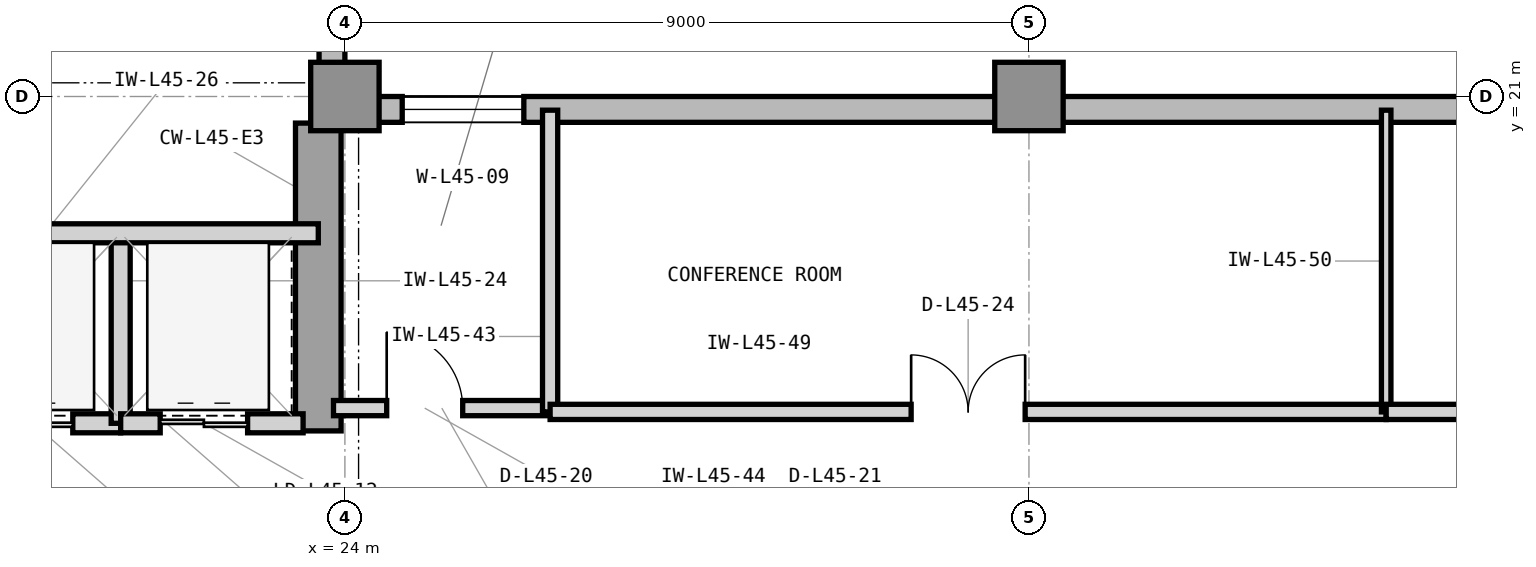
"""IFC4 building model, lengths in metres.
Left out: names, types, materials, properties, quantities, classifications, styles, units other than length and angle.
Written with IfcOpenShell. Run it as: python <this file> out.ifc"""

import sys

from ifc_helpers import new_model, si_unit, direction, frame, frame_2d, origin, origin_2d, place, context, subcontext, project, spatial, rectangle, extrude, element, fill, save


model = new_model("IFC4")
c1 = context("Model", 3, precision=1e-05, world=origin(), true_north=direction((0.0, 1.0)))
c2 = subcontext(c1, "Body", "Model", "MODEL_VIEW")
j1 = project(units=[si_unit("LENGTHUNIT", "METRE"), si_unit("PLANEANGLEUNIT", "RADIAN")], contexts=[c1])
p1 = place(None, origin())
s1 = spatial("IfcSite", under=j1, at=p1, CompositionType="ELEMENT")
p2 = place(p1, origin())
s2 = spatial("IfcBuilding", under=s1, at=p2, CompositionType="ELEMENT")
p3 = place(p2, frame((0.0, 0.0, 187.8)))
s3 = spatial("IfcBuildingStorey", under=s2, at=p3, CompositionType="ELEMENT", Elevation=187.8)
p4 = place(p3, frame((23.65, 16.6, 0.0), z_axis=(0.0, 0.0, 1.0), x_axis=(0.0, 1.0, 0.0)))
e1 = element("IfcWall", 1, at=p4, inside=s3, PredefinedType="SHEAR", context=c2, shape_type="SweptSolid", body=[
    extrude(rectangle(XDim=4.05, YDim=0.6, at=frame_2d((2.025, 0.0))), origin(), (0.0, 0.0, 1.0), 3.9),
])
for number, where, z_axis, x_axis in (
    (2, (24.0, 21.0, 0.0), (0.0, 0.0, 1.0), (1.0, 0.0, 0.0)),
    (3, (33.0, 21.0, 0.0), (0.0, 0.0, 1.0), (1.0, 0.0, 0.0)),
):
    element("IfcColumn", number, at=place(p3, frame(where, z_axis=z_axis, x_axis=x_axis)), inside=s3, PredefinedType="COLUMN", context=c2, shape_type="SweptSolid", body=[
        extrude(rectangle(XDim=0.9, YDim=0.9, at=origin_2d()), origin(), (0.0, 0.0, 1.0), 3.9),
    ])
p5 = place(p3, frame((55.4, 20.83, 0.0), z_axis=(0.0, 0.0, 1.0), x_axis=(-1.0, 0.0, 0.0)))
e4 = element("IfcWall", 4, at=p5, inside=s3, PredefinedType="STANDARD", context=c2, shape_type="SweptSolid", body=[
    extrude(rectangle(XDim=31.4, YDim=0.34, at=frame_2d((15.7, 0.0))), origin(), (0.0, 0.0, 1.0), 3.7),
])
p6 = place(p5, frame((29.046, 0.0, 0.9)))
e5 = element("IfcOpeningElement", 5, at=p6, cuts=e4, PredefinedType="OPENING", context=c2, shape_type="SweptSolid", body=[
    extrude(rectangle(XDim=1.6, YDim=2.2, at=frame_2d((0.8, 1.1))), frame((0.0, 0.18, 0.0), z_axis=(0.0, -1.0, 0.0), x_axis=(1.0, 0.0, 0.0)), (0.0, 0.0, 1.0), 0.36),
])
p7 = place(p5, frame((10.125, 0.0, 0.9)))
e6 = element("IfcOpeningElement", 6, at=p7, cuts=e4, PredefinedType="OPENING", context=c2, shape_type="SweptSolid", body=[
    extrude(rectangle(XDim=2.3, YDim=2.2, at=frame_2d((1.15, 1.1))), frame((0.0, 0.18, 0.0), z_axis=(0.0, -1.0, 0.0), x_axis=(1.0, 0.0, 0.0)), (0.0, 0.0, 1.0), 0.36),
])
p8 = place(p3, frame((23.83, 21.0, 0.0), z_axis=(0.0, 0.0, 1.0), x_axis=(0.0, 1.0, 0.0)))
e7 = element("IfcWall", 7, at=p8, inside=s3, PredefinedType="STANDARD", context=c2, shape_type="SweptSolid", body=[
    extrude(rectangle(XDim=22.4, YDim=0.34, at=frame_2d((11.2, 0.0))), origin(), (0.0, 0.0, 1.0), 3.7),
])
p9 = place(p8, frame((10.955, 0.0, 0.9)))
e8 = element("IfcOpeningElement", 8, at=p9, cuts=e7, PredefinedType="OPENING", context=c2, shape_type="SweptSolid", body=[
    extrude(rectangle(XDim=2.3, YDim=2.2, at=frame_2d((1.15, 1.1))), frame((0.0, 0.18, 0.0), z_axis=(0.0, -1.0, 0.0), x_axis=(1.0, 0.0, 0.0)), (0.0, 0.0, 1.0), 0.36),
])
p10 = place(p3, frame((18.75, 16.7, 0.0), z_axis=(0.0, 0.0, 1.0), x_axis=(1.0, 0.0, 0.0)))
e9 = element("IfcWall", 9, at=p10, inside=s3, PredefinedType="PARTITIONING", context=c2, shape_type="SweptSolid", body=[
    extrude(rectangle(XDim=2.3, YDim=0.25, at=frame_2d((1.15, 0.0))), origin(), (0.0, 0.0, 1.0), 3.283),
])
p11 = place(p10, frame((0.52, 0.0, 0.0)))
e10 = element("IfcOpeningElement", 10, at=p11, cuts=e9, PredefinedType="OPENING", context=c2, shape_type="SweptSolid", body=[
    extrude(rectangle(XDim=1.15, YDim=2.25, at=frame_2d((0.575, 1.125))), frame((0.0, 0.135, 0.0), z_axis=(0.0, -1.0, 0.0), x_axis=(1.0, 0.0, 0.0)), (0.0, 0.0, 1.0), 0.27),
])
p12 = place(p3, frame((21.05, 16.7, 0.0), z_axis=(0.0, 0.0, 1.0), x_axis=(0.0, 1.0, 0.0)))
e11 = element("IfcWall", 11, at=p12, inside=s3, PredefinedType="PARTITIONING", context=c2, shape_type="SweptSolid", body=[
    extrude(rectangle(XDim=2.5, YDim=0.25, at=frame_2d((1.25, 0.0))), origin(), (0.0, 0.0, 1.0), 3.69),
])
p13 = place(p3, frame((21.05, 16.7, 0.0), z_axis=(0.0, 0.0, 1.0), x_axis=(1.0, 0.0, 0.0)))
e12 = element("IfcWall", 12, at=p13, inside=s3, PredefinedType="PARTITIONING", context=c2, shape_type="SweptSolid", body=[
    extrude(rectangle(XDim=2.4, YDim=0.25, at=frame_2d((1.2, 0.0))), origin(), (0.0, 0.0, 1.0), 3.283),
])
p14 = place(p13, frame((0.52, 0.0, 0.0)))
e13 = element("IfcOpeningElement", 13, at=p14, cuts=e12, PredefinedType="OPENING", context=c2, shape_type="SweptSolid", body=[
    extrude(rectangle(XDim=1.15, YDim=2.25, at=frame_2d((0.575, 1.125))), frame((0.0, 0.135, 0.0), z_axis=(0.0, -1.0, 0.0), x_axis=(1.0, 0.0, 0.0)), (0.0, 0.0, 1.0), 0.27),
])
p15 = place(p3, frame((16.45, 19.2, 0.0), z_axis=(0.0, 0.0, 1.0), x_axis=(1.0, 0.0, 0.0)))
e14 = element("IfcWall", 14, at=p15, inside=s3, PredefinedType="PARTITIONING", context=c2, shape_type="SweptSolid", body=[
    extrude(rectangle(XDim=7.2, YDim=0.25, at=frame_2d((3.6, 0.0))), origin(), (0.0, 0.0, 1.0), 3.69),
])
p16 = place(p3, frame((23.85, 16.9, 0.0), z_axis=(0.0, 0.0, 1.0), x_axis=(1.0, 0.0, 0.0)))
e15 = element("IfcWall", 15, at=p16, inside=s3, PredefinedType="PARTITIONING", context=c2, shape_type="SweptSolid", body=[
    extrude(rectangle(XDim=2.85, YDim=0.2, at=frame_2d((1.425, 0.0))), origin(), (0.0, 0.0, 1.0), 3.69),
])
p17 = place(p16, frame((0.7, 0.0, 0.0)))
e16 = element("IfcOpeningElement", 16, at=p17, cuts=e15, PredefinedType="OPENING", context=c2, shape_type="SweptSolid", body=[
    extrude(rectangle(XDim=1.0, YDim=2.15, at=frame_2d((0.5, 1.075))), frame((0.0, 0.11, 0.0), z_axis=(0.0, -1.0, 0.0), x_axis=(1.0, 0.0, 0.0)), (0.0, 0.0, 1.0), 0.22),
])
p18 = place(p3, frame((26.7, 16.85, 0.0), z_axis=(0.0, 0.0, 1.0), x_axis=(0.0, 1.0, 0.0)))
e17 = element("IfcWall", 17, at=p18, inside=s3, PredefinedType="PARTITIONING", context=c2, shape_type="SweptSolid", body=[
    extrude(rectangle(XDim=3.97, YDim=0.2, at=frame_2d((1.985, 0.0))), origin(), (0.0, 0.0, 1.0), 3.69),
])
p19 = place(p3, frame((26.7, 16.85, 0.0), z_axis=(0.0, 0.0, 1.0), x_axis=(1.0, 0.0, 0.0)))
e18 = element("IfcWall", 18, at=p19, inside=s3, PredefinedType="PARTITIONING", context=c2, shape_type="SweptSolid", body=[
    extrude(rectangle(XDim=11.0, YDim=0.2, at=frame_2d((5.5, 0.0))), origin(), (0.0, 0.0, 1.0), 3.69),
])
p20 = place(p19, frame((4.75, 0.0, 0.0)))
e19 = element("IfcOpeningElement", 19, at=p20, cuts=e18, PredefinedType="OPENING", context=c2, shape_type="SweptSolid", body=[
    extrude(rectangle(XDim=1.5, YDim=2.3, at=frame_2d((0.75, 1.15))), frame((0.0, 0.11, 0.0), z_axis=(0.0, -1.0, 0.0), x_axis=(1.0, 0.0, 0.0)), (0.0, 0.0, 1.0), 0.22),
])
p21 = place(p3, frame((37.7, 16.85, 0.0), z_axis=(0.0, 0.0, 1.0), x_axis=(0.0, 1.0, 0.0)))
e20 = element("IfcWall", 20, at=p21, inside=s3, PredefinedType="PARTITIONING", context=c2, shape_type="SweptSolid", body=[
    extrude(rectangle(XDim=3.97, YDim=0.125, at=frame_2d((1.985, 0.0))), origin(), (0.0, 0.0, 1.0), 3.69),
])
p22 = place(p3, frame((37.7, 16.85, 0.0), z_axis=(0.0, 0.0, 1.0), x_axis=(1.0, 0.0, 0.0)))
e21 = element("IfcWall", 21, at=p22, inside=s3, PredefinedType="PARTITIONING", context=c2, shape_type="SweptSolid", body=[
    extrude(rectangle(XDim=10.3, YDim=0.2, at=frame_2d((5.15, 0.0))), origin(), (0.0, 0.0, 1.0), 3.69),
])
p23 = place(p22, frame((4.65, 0.0, 0.0)))
e22 = element("IfcOpeningElement", 22, at=p23, cuts=e21, PredefinedType="OPENING", context=c2, shape_type="SweptSolid", body=[
    extrude(rectangle(XDim=1.0, YDim=2.15, at=frame_2d((0.5, 1.075))), frame((0.0, 0.11, 0.0), z_axis=(0.0, -1.0, 0.0), x_axis=(1.0, 0.0, 0.0)), (0.0, 0.0, 1.0), 0.22),
])
p24 = place(p11, origin())
e23 = element("IfcDoor", 23, at=p24, inside=s3, OperationType="DOUBLE_DOOR_SLIDING", PredefinedType="DOOR", context=c2, shape_type="SweptSolid", body=[
    extrude(rectangle(XDim=1.15, YDim=2.25, at=frame_2d((0.575, 1.125))), frame((0.0, 0.025, 0.0), z_axis=(0.0, -1.0, 0.0), x_axis=(1.0, 0.0, 0.0)), (0.0, 0.0, 1.0), 0.05),
])
fill(e10, e23)
p25 = place(p14, origin())
e24 = element("IfcDoor", 24, at=p25, inside=s3, OperationType="DOUBLE_DOOR_SLIDING", PredefinedType="DOOR", context=c2, shape_type="SweptSolid", body=[
    extrude(rectangle(XDim=1.15, YDim=2.25, at=frame_2d((0.575, 1.125))), frame((0.0, 0.025, 0.0), z_axis=(0.0, -1.0, 0.0), x_axis=(1.0, 0.0, 0.0)), (0.0, 0.0, 1.0), 0.05),
])
fill(e13, e24)
p26 = place(p17, origin())
e25 = element("IfcDoor", 25, at=p26, inside=s3, OperationType="SINGLE_SWING_LEFT", PredefinedType="DOOR", context=c2, shape_type="SweptSolid", body=[
    extrude(rectangle(XDim=1.0, YDim=2.15, at=frame_2d((0.5, 1.075))), frame((0.0, 0.025, 0.0), z_axis=(0.0, -1.0, 0.0), x_axis=(1.0, 0.0, 0.0)), (0.0, 0.0, 1.0), 0.05),
])
fill(e16, e25)
p27 = place(p20, origin())
e26 = element("IfcDoor", 26, at=p27, inside=s3, OperationType="DOUBLE_DOOR_SINGLE_SWING", PredefinedType="DOOR", context=c2, shape_type="SweptSolid", body=[
    extrude(rectangle(XDim=1.5, YDim=2.3, at=frame_2d((0.75, 1.15))), frame((0.0, 0.025, 0.0), z_axis=(0.0, -1.0, 0.0), x_axis=(1.0, 0.0, 0.0)), (0.0, 0.0, 1.0), 0.05),
])
fill(e19, e26)
p28 = place(p6, origin())
e27 = element("IfcWindow", 27, at=p28, inside=s3, PartitioningType="SINGLE_PANEL", PredefinedType="WINDOW", context=c2, shape_type="SweptSolid", body=[
    extrude(rectangle(XDim=1.6, YDim=2.2, at=frame_2d((0.8, 1.1))), frame((0.0, 0.11, 0.0), z_axis=(0.0, -1.0, 0.0), x_axis=(1.0, 0.0, 0.0)), (0.0, 0.0, 1.0), 0.06),
])
fill(e5, e27)
save(model, sys.argv[1])
